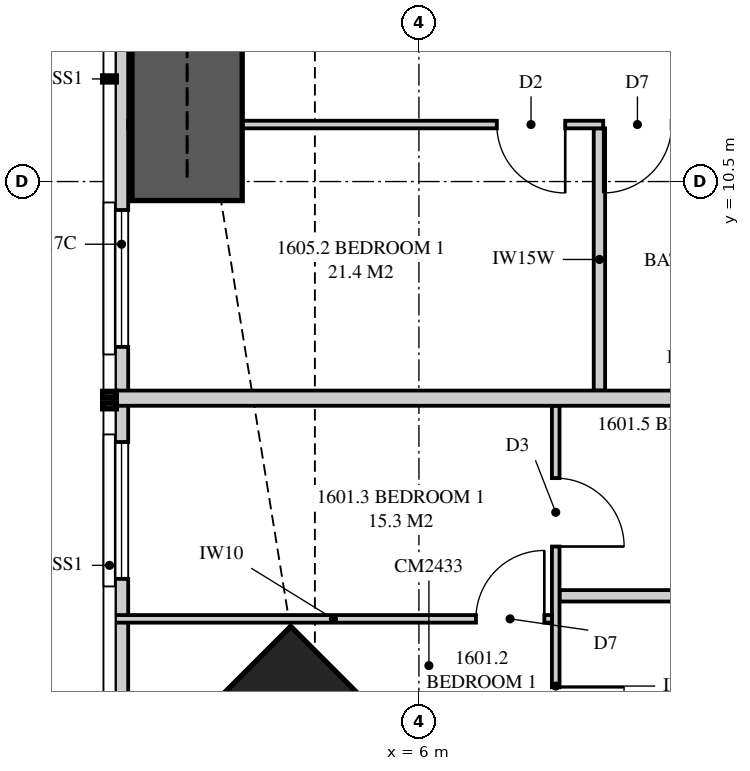
"""IFC4 building model, lengths in metres.
Left out: names, types, materials, properties, quantities, classifications, styles, units other than length and angle.
Written with IfcOpenShell. Run it as: python <this file> out.ifc"""

import sys

from ifc_helpers import new_model, si_unit, direction, frame, frame_2d, origin, origin_2d, place, context, subcontext, project, spatial, polyline, rectangle, outline, extrude, element, fill, save


model = new_model("IFC4")
c1 = context("Model", 3, precision=1e-05, world=origin(), true_north=direction((0.0, 1.0)))
c2 = subcontext(c1, "Body", "Model", "MODEL_VIEW")
j1 = project(units=[si_unit("LENGTHUNIT", "METRE"), si_unit("PLANEANGLEUNIT", "RADIAN")], contexts=[c1])
p1 = place(None, origin())
s1 = spatial("IfcSite", under=j1, at=p1, CompositionType="ELEMENT")
p2 = place(p1, origin())
s2 = spatial("IfcBuilding", under=s1, at=p2, CompositionType="ELEMENT")
p3 = place(p2, frame((0.0, 0.0, 61.2)))
s3 = spatial("IfcBuildingStorey", under=s2, at=p3, CompositionType="ELEMENT", Elevation=61.2)
p4 = place(p3, frame((4.631, 2.631, 0.0), z_axis=(0.0, 0.0, 1.0), x_axis=(0.707106781187, 0.707106781187, 0.0)))
e1 = element("IfcColumn", 1, at=p4, inside=s3, PredefinedType="COLUMN", context=c2, shape_type="SweptSolid", body=[
    extrude(rectangle(XDim=2.4, YDim=3.3, at=origin_2d()), origin(), (0.0, 0.0, 1.0), 3.35),
])
p5 = place(p3, frame((2.087, 16.3, 0.0), z_axis=(0.0, 0.0, 1.0), x_axis=(0.0, -1.0, 0.0)))
e2 = element("IfcWall", 2, at=p5, inside=s3, PredefinedType="SOLIDWALL", context=c2, shape_type="SweptSolid", body=[
    extrude(outline(polyline([(0.0, 0.0), (13.249, 0.0), (13.249, 3.11), (3.519, 3.11), (3.519, 2.15), (3.426, 2.15), (3.426, 3.11), (3.3, 3.11), (3.3, 2.15), (0.0, 2.15), (0.0, 0.0)])), frame((0.0, 0.087, 0.0), z_axis=(0.0, -1.0, 0.0), x_axis=(1.0, 0.0, 0.0)), (0.0, 0.0, 1.0), 0.175),
])
p6 = place(p5, frame((6.175, 0.0, 0.4)))
e3 = element("IfcOpeningElement", 3, at=p6, cuts=e2, PredefinedType="OPENING", context=c2, shape_type="SweptSolid", body=[
    extrude(rectangle(XDim=1.8, YDim=1.7, at=frame_2d((0.9, 0.85))), frame((0.0, 0.097, 0.0), z_axis=(0.0, -1.0, 0.0), x_axis=(1.0, 0.0, 0.0)), (0.0, 0.0, 1.0), 0.195),
])
p7 = place(p5, frame((9.227, 0.0, 0.4)))
e4 = element("IfcOpeningElement", 4, at=p7, cuts=e2, PredefinedType="OPENING", context=c2, shape_type="SweptSolid", body=[
    extrude(rectangle(XDim=1.8, YDim=1.7, at=frame_2d((0.9, 0.85))), frame((0.0, 0.097, 0.0), z_axis=(0.0, -1.0, 0.0), x_axis=(1.0, 0.0, 0.0)), (0.0, 0.0, 1.0), 0.195),
])
p8 = place(p3, frame((7.8, 0.175, 0.0), z_axis=(0.0, 0.0, 1.0), x_axis=(0.0, 1.0, 0.0)))
e5 = element("IfcWall", 5, at=p8, inside=s3, PredefinedType="PARTITIONING", context=c2, shape_type="SweptSolid", body=[
    extrude(outline(polyline([(0.0, 0.0), (7.375, 0.0), (7.375, 3.11), (2.697, 3.11), (2.697, 2.15), (0.943, 2.15), (0.943, 3.11), (0.0, 3.11), (0.0, 0.0)])), frame((0.0, 0.05, 0.0), z_axis=(0.0, -1.0, 0.0), x_axis=(1.0, 0.0, 0.0)), (0.0, 0.0, 1.0), 0.1),
])
p9 = place(p8, frame((2.772, 0.0, 0.0)))
e6 = element("IfcOpeningElement", 6, at=p9, cuts=e5, PredefinedType="OPENING", context=c2, shape_type="SweptSolid", body=[
    extrude(rectangle(XDim=0.9, YDim=2.1, at=frame_2d((0.45, 1.05))), frame((0.0, 0.06, 0.0), z_axis=(0.0, -1.0, 0.0), x_axis=(1.0, 0.0, 0.0)), (0.0, 0.0, 1.0), 0.12),
])
p10 = place(p8, frame((5.523, 0.0, 0.0)))
e7 = element("IfcOpeningElement", 7, at=p10, cuts=e5, PredefinedType="OPENING", context=c2, shape_type="SweptSolid", body=[
    extrude(rectangle(XDim=0.9, YDim=2.1, at=frame_2d((0.45, 1.05))), frame((0.0, 0.06, 0.0), z_axis=(0.0, -1.0, 0.0), x_axis=(1.0, 0.0, 0.0)), (0.0, 0.0, 1.0), 0.12),
])
p11 = place(p3, frame((2.0, 4.747, 0.0), z_axis=(0.0, 0.0, 1.0), x_axis=(1.0, 0.0, 0.0)))
e8 = element("IfcWall", 8, at=p11, inside=s3, PredefinedType="PARTITIONING", context=c2, shape_type="SweptSolid", body=[
    extrude(outline(polyline([(0.0, 0.0), (5.75, 0.0), (5.75, 3.11), (3.16, 3.11), (3.16, 2.15), (1.417, 2.15), (1.417, 3.11), (0.0, 3.11), (0.0, 0.0)])), frame((0.0, 0.05, 0.0), z_axis=(0.0, -1.0, 0.0), x_axis=(1.0, 0.0, 0.0)), (0.0, 0.0, 1.0), 0.1),
])
p12 = place(p11, frame((4.75, 0.0, 0.0)))
e9 = element("IfcOpeningElement", 9, at=p12, cuts=e8, PredefinedType="OPENING", context=c2, shape_type="SweptSolid", body=[
    extrude(rectangle(XDim=0.9, YDim=2.1, at=frame_2d((0.45, 1.05))), frame((0.0, 0.06, 0.0), z_axis=(0.0, -1.0, 0.0), x_axis=(1.0, 0.0, 0.0)), (0.0, 0.0, 1.0), 0.12),
])
p13 = place(p3, frame((7.85, 5.05, 0.0), z_axis=(0.0, 0.0, 1.0), x_axis=(1.0, 0.0, 0.0)))
e10 = element("IfcWall", 10, at=p13, inside=s3, PredefinedType="PLUMBINGWALL", context=c2, shape_type="SweptSolid", body=[
    extrude(outline(polyline([(0.0, 0.0), (5.9, 0.0), (5.9, 3.11), (5.462, 3.11), (5.462, 2.541), (4.838, 2.541), (4.838, 3.11), (3.635, 3.11), (3.635, 2.51), (1.065, 2.51), (1.065, 3.11), (0.0, 3.11), (0.0, 0.0)])), frame((0.0, 0.075, 0.0), z_axis=(0.0, -1.0, 0.0), x_axis=(1.0, 0.0, 0.0)), (0.0, 0.0, 1.0), 0.15),
])
p14 = place(p13, frame((4.6, 0.0, 0.0)))
e11 = element("IfcOpeningElement", 11, at=p14, cuts=e10, PredefinedType="OPENING", context=c2, shape_type="SweptSolid", body=[
    extrude(rectangle(XDim=0.9, YDim=2.1, at=frame_2d((0.45, 1.05))), frame((0.0, 0.085, 0.0), z_axis=(0.0, -1.0, 0.0), x_axis=(1.0, 0.0, 0.0)), (0.0, 0.0, 1.0), 0.17),
])
p15 = place(p3, frame((2.0, 7.65, 0.0), z_axis=(0.0, 0.0, 1.0), x_axis=(1.0, 0.0, 0.0)))
e12 = element("IfcWall", 12, at=p15, inside=s3, PredefinedType="PARTITIONING", context=c2, shape_type="SweptSolid", body=[
    extrude(outline(polyline([(0.0, 0.0), (15.525, 0.0), (15.525, 3.11), (11.337, 3.11), (11.337, 2.541), (10.663, 2.541), (10.663, 3.11), (9.51, 3.11), (9.51, 2.51), (6.89, 2.51), (6.89, 3.11), (2.969, 3.11), (2.969, 2.541), (2.74, 2.541), (2.74, 2.15), (0.896, 2.15), (0.896, 3.11), (0.0, 3.11), (0.0, 0.0)])), frame((0.0, 0.1, 0.0), z_axis=(0.0, -1.0, 0.0), x_axis=(1.0, 0.0, 0.0)), (0.0, 0.0, 1.0), 0.2),
])
p16 = place(p3, frame((2.175, 11.25, 0.0), z_axis=(0.0, 0.0, 1.0), x_axis=(1.0, 0.0, 0.0)))
e13 = element("IfcWall", 13, at=p16, inside=s3, PredefinedType="PARTITIONING", context=c2, shape_type="SweptSolid", body=[
    extrude(outline(polyline([(0.188, 3.11), (0.0, 3.11), (0.0, 0.0), (0.529, 0.0), (0.529, 0.273), (1.021, 0.273), (1.021, 0.0), (15.35, 0.0), (15.35, 3.11), (11.112, 3.11), (11.112, 2.541), (10.538, 2.541), (10.538, 3.11), (9.285, 3.11), (9.285, 2.51), (6.765, 2.51), (6.765, 3.11), (2.744, 3.11), (2.744, 2.541), (2.169, 2.541), (2.169, 3.11), (1.93, 3.11), (1.93, 2.15), (1.021, 2.15), (1.021, 1.876), (0.529, 1.876), (0.529, 2.15), (0.188, 2.15), (0.188, 3.11)])), frame((0.0, 0.05, 0.0), z_axis=(0.0, -1.0, 0.0), x_axis=(1.0, 0.0, 0.0)), (0.0, 0.0, 1.0), 0.1),
])
p17 = place(p16, frame((4.85, 0.0, 0.0)))
e14 = element("IfcOpeningElement", 14, at=p17, cuts=e13, PredefinedType="OPENING", context=c2, shape_type="SweptSolid", body=[
    extrude(rectangle(XDim=0.9, YDim=2.1, at=frame_2d((0.45, 1.05))), frame((0.0, 0.06, 0.0), z_axis=(0.0, -1.0, 0.0), x_axis=(1.0, 0.0, 0.0)), (0.0, 0.0, 1.0), 0.12),
])
p18 = place(p16, frame((6.25, 0.0, 0.0)))
e15 = element("IfcOpeningElement", 15, at=p18, cuts=e13, PredefinedType="OPENING", context=c2, shape_type="SweptSolid", body=[
    extrude(rectangle(XDim=0.9, YDim=2.1, at=frame_2d((0.45, 1.05))), frame((0.0, 0.06, 0.0), z_axis=(0.0, -1.0, 0.0), x_axis=(1.0, 0.0, 0.0)), (0.0, 0.0, 1.0), 0.12),
])
p19 = place(p16, frame((11.675, 0.0, 0.0)))
e16 = element("IfcOpeningElement", 16, at=p19, cuts=e13, PredefinedType="OPENING", context=c2, shape_type="SweptSolid", body=[
    extrude(rectangle(XDim=0.7, YDim=2.1, at=frame_2d((0.35, 1.05))), frame((0.0, 0.06, 0.0), z_axis=(0.0, -1.0, 0.0), x_axis=(1.0, 0.0, 0.0)), (0.0, 0.0, 1.0), 0.12),
])
p20 = place(p3, frame((8.375, 7.75, 0.0), z_axis=(0.0, 0.0, 1.0), x_axis=(0.0, 1.0, 0.0)))
e17 = element("IfcWall", 17, at=p20, inside=s3, PredefinedType="PLUMBINGWALL", context=c2, shape_type="SweptSolid", body=[
    extrude(rectangle(XDim=3.45, YDim=0.15, at=frame_2d((1.725, 0.0))), origin(), (0.0, 0.0, 1.0), 3.11),
])
p21 = place(p3, frame((2.95, 10.25, 0.0), z_axis=(0.0, 0.0, 1.0), x_axis=(0.0, 1.0, 0.0)))
e18 = element("IfcWall", 18, at=p21, inside=s3, PredefinedType="SHEAR", context=c2, shape_type="SweptSolid", body=[
    extrude(rectangle(XDim=5.5, YDim=1.45, at=frame_2d((2.75, 0.0))), origin(), (0.0, 0.0, 1.0), 3.35),
])
p22 = place(p6, origin())
e19 = element("IfcWindow", 19, at=p22, inside=s3, PartitioningType="SINGLE_PANEL", PredefinedType="WINDOW", context=c2, shape_type="SweptSolid", body=[
    extrude(rectangle(XDim=1.8, YDim=1.7, at=frame_2d((0.9, 0.85))), frame((0.0, 0.03, 0.0), z_axis=(0.0, -1.0, 0.0), x_axis=(1.0, 0.0, 0.0)), (0.0, 0.0, 1.0), 0.06),
])
fill(e3, e19)
p23 = place(p7, origin())
e20 = element("IfcWindow", 20, at=p23, inside=s3, PartitioningType="SINGLE_PANEL", PredefinedType="WINDOW", context=c2, shape_type="SweptSolid", body=[
    extrude(rectangle(XDim=1.8, YDim=1.7, at=frame_2d((0.9, 0.85))), frame((0.0, 0.03, 0.0), z_axis=(0.0, -1.0, 0.0), x_axis=(1.0, 0.0, 0.0)), (0.0, 0.0, 1.0), 0.06),
])
fill(e4, e20)
p24 = place(p12, origin())
e21 = element("IfcDoor", 21, at=p24, inside=s3, OperationType="SINGLE_SWING_RIGHT", PredefinedType="DOOR", context=c2, shape_type="SweptSolid", body=[
    extrude(rectangle(XDim=0.9, YDim=2.1, at=frame_2d((0.45, 1.05))), frame((0.0, 0.025, 0.0), z_axis=(0.0, -1.0, 0.0), x_axis=(1.0, 0.0, 0.0)), (0.0, 0.0, 1.0), 0.05),
])
fill(e9, e21)
p25 = place(p9, frame((0.9, 0.0, 0.0), z_axis=(0.0, 0.0, 1.0), x_axis=(-1.0, 0.0, 0.0)))
e22 = element("IfcDoor", 22, at=p25, inside=s3, OperationType="SINGLE_SWING_LEFT", PredefinedType="DOOR", context=c2, shape_type="SweptSolid", body=[
    extrude(rectangle(XDim=0.9, YDim=2.1, at=frame_2d((0.45, 1.05))), frame((0.0, 0.025, 0.0), z_axis=(0.0, -1.0, 0.0), x_axis=(1.0, 0.0, 0.0)), (0.0, 0.0, 1.0), 0.05),
])
fill(e6, e22)
p26 = place(p10, frame((0.9, 0.0, 0.0), z_axis=(0.0, 0.0, 1.0), x_axis=(-1.0, 0.0, 0.0)))
e23 = element("IfcDoor", 23, at=p26, inside=s3, OperationType="SINGLE_SWING_RIGHT", PredefinedType="DOOR", context=c2, shape_type="SweptSolid", body=[
    extrude(rectangle(XDim=0.9, YDim=2.1, at=frame_2d((0.45, 1.05))), frame((0.0, 0.025, 0.0), z_axis=(0.0, -1.0, 0.0), x_axis=(1.0, 0.0, 0.0)), (0.0, 0.0, 1.0), 0.05),
])
fill(e7, e23)
p27 = place(p17, frame((0.9, 0.0, 0.0), z_axis=(0.0, 0.0, 1.0), x_axis=(-1.0, 0.0, 0.0)))
e24 = element("IfcDoor", 24, at=p27, inside=s3, OperationType="SINGLE_SWING_LEFT", PredefinedType="DOOR", context=c2, shape_type="SweptSolid", body=[
    extrude(rectangle(XDim=0.9, YDim=2.1, at=frame_2d((0.45, 1.05))), frame((0.0, 0.025, 0.0), z_axis=(0.0, -1.0, 0.0), x_axis=(1.0, 0.0, 0.0)), (0.0, 0.0, 1.0), 0.05),
])
fill(e14, e24)
p28 = place(p18, frame((0.9, 0.0, 0.0), z_axis=(0.0, 0.0, 1.0), x_axis=(-1.0, 0.0, 0.0)))
e25 = element("IfcDoor", 25, at=p28, inside=s3, OperationType="SINGLE_SWING_RIGHT", PredefinedType="DOOR", context=c2, shape_type="SweptSolid", body=[
    extrude(rectangle(XDim=0.9, YDim=2.1, at=frame_2d((0.45, 1.05))), frame((0.0, 0.025, 0.0), z_axis=(0.0, -1.0, 0.0), x_axis=(1.0, 0.0, 0.0)), (0.0, 0.0, 1.0), 0.05),
])
fill(e15, e25)
save(model, sys.argv[1])
